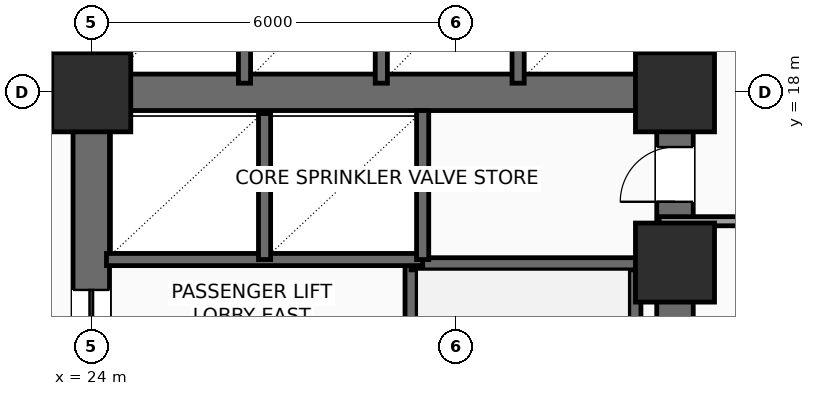
"""IFC4 building model, lengths in metres.
Left out: names, types, materials, properties, quantities, classifications, styles, units other than length and angle.
Written with IfcOpenShell. Run it as: python <this file> out.ifc"""

import sys

from ifc_helpers import new_model, si_unit, direction, frame, frame_2d, origin, origin_2d, place, context, subcontext, project, spatial, rectangle, extrude, element, fill, save


model = new_model("IFC4")
c1 = context("Model", 3, precision=1e-05, world=origin(), true_north=direction((0.0, 1.0)))
c2 = subcontext(c1, "Body", "Model", "MODEL_VIEW")
j1 = project(units=[si_unit("LENGTHUNIT", "METRE"), si_unit("PLANEANGLEUNIT", "RADIAN")], contexts=[c1])
p1 = place(None, origin())
s1 = spatial("IfcSite", under=j1, at=p1, CompositionType="ELEMENT")
p2 = place(p1, origin())
s2 = spatial("IfcBuilding", under=s1, at=p2, CompositionType="ELEMENT")
p3 = place(p2, frame((0.0, 0.0, 32.4)))
s3 = spatial("IfcBuildingStorey", under=s2, at=p3, CompositionType="ELEMENT", Elevation=32.4)
for number, where, z_axis, x_axis in (
    (1, (24.0, 18.0, 0.0), (0.0, 0.0, 1.0), (1.0, 0.0, 0.0)),
    (2, (33.6, 15.2, 0.0), (0.0, 0.0, 1.0), (1.0, 0.0, 0.0)),
    (3, (33.6, 18.0, 0.0), (0.0, 0.0, 1.0), (1.0, 0.0, 0.0)),
):
    element("IfcColumn", number, at=place(p3, frame(where, z_axis=z_axis, x_axis=x_axis)), inside=s3, PredefinedType="COLUMN", context=c2, shape_type="SweptSolid", body=[
        extrude(rectangle(XDim=1.3, YDim=1.3, at=origin_2d()), origin(), (0.0, 0.0, 1.0), 3.9),
    ])
p4 = place(p3, frame((24.0, 18.0, 0.0), z_axis=(0.0, 0.0, 1.0), x_axis=(1.0, 0.0, 0.0)))
e4 = element("IfcWall", 4, at=p4, inside=s3, PredefinedType="SHEAR", context=c2, shape_type="SweptSolid", body=[
    extrude(rectangle(XDim=9.6, YDim=0.6, at=frame_2d((4.8, 0.0))), origin(), (0.0, 0.0, 1.0), 3.65),
])
p5 = place(p3, frame((24.0, 6.0, 0.0), z_axis=(0.0, 0.0, 1.0), x_axis=(0.0, 1.0, 0.0)))
e5 = element("IfcWall", 5, at=p5, inside=s3, PredefinedType="SHEAR", context=c2, shape_type="SweptSolid", body=[
    extrude(rectangle(XDim=12.0, YDim=0.6, at=frame_2d((6.0, 0.0))), origin(), (0.0, 0.0, 1.0), 3.65),
])
p6 = place(p5, frame((7.15, 0.0, 0.0)))
e6 = element("IfcOpeningElement", 6, at=p6, cuts=e5, PredefinedType="OPENING", context=c2, shape_type="SweptSolid", body=[
    extrude(rectangle(XDim=1.6, YDim=2.3, at=frame_2d((0.8, 1.15))), frame((0.0, 0.31, 0.0), z_axis=(0.0, -1.0, 0.0), x_axis=(1.0, 0.0, 0.0)), (0.0, 0.0, 1.0), 0.62),
])
p7 = place(p3, frame((33.6, 6.0, 0.0), z_axis=(0.0, 0.0, 1.0), x_axis=(0.0, 1.0, 0.0)))
e7 = element("IfcWall", 7, at=p7, inside=s3, PredefinedType="SHEAR", context=c2, shape_type="SweptSolid", body=[
    extrude(rectangle(XDim=12.0, YDim=0.6, at=frame_2d((6.0, 0.0))), origin(), (0.0, 0.0, 1.0), 3.65),
])
p8 = place(p7, frame((10.2, 0.0, 0.0)))
e8 = element("IfcOpeningElement", 8, at=p8, cuts=e7, PredefinedType="OPENING", context=c2, shape_type="SweptSolid", body=[
    extrude(rectangle(XDim=0.9, YDim=2.15, at=frame_2d((0.45, 1.075))), frame((0.0, 0.31, 0.0), z_axis=(0.0, -1.0, 0.0), x_axis=(1.0, 0.0, 0.0)), (0.0, 0.0, 1.0), 0.62),
])
p9 = place(p3, frame((29.26, 6.3, 0.0), z_axis=(0.0, 0.0, 1.0), x_axis=(0.0, 1.0, 0.0)))
e9 = element("IfcWall", 9, at=p9, inside=s3, PredefinedType="SHEAR", context=c2, shape_type="SweptSolid", body=[
    extrude(rectangle(XDim=8.88, YDim=0.2, at=frame_2d((4.44, 0.0))), origin(), (0.0, 0.0, 1.0), 3.65),
])
p10 = place(p9, frame((0.35, 0.0, 0.0)))
e10 = element("IfcOpeningElement", 10, at=p10, cuts=e9, PredefinedType="OPENING", context=c2, shape_type="SweptSolid", body=[
    extrude(rectangle(XDim=1.1, YDim=2.2, at=frame_2d((0.55, 1.1))), frame((0.0, 0.11, 0.0), z_axis=(0.0, -1.0, 0.0), x_axis=(1.0, 0.0, 0.0)), (0.0, 0.0, 1.0), 0.22),
])
p11 = place(p3, frame((32.94, 6.3, 0.0), z_axis=(0.0, 0.0, 1.0), x_axis=(0.0, 1.0, 0.0)))
e11 = element("IfcWall", 11, at=p11, inside=s3, PredefinedType="SHEAR", context=c2, shape_type="SweptSolid", body=[
    extrude(rectangle(XDim=8.88, YDim=0.2, at=frame_2d((4.44, 0.0))), origin(), (0.0, 0.0, 1.0), 3.65),
])
p12 = place(p3, frame((29.26, 15.18, 0.0), z_axis=(0.0, 0.0, 1.0), x_axis=(1.0, 0.0, 0.0)))
e12 = element("IfcWall", 12, at=p12, inside=s3, PredefinedType="SHEAR", context=c2, shape_type="SweptSolid", body=[
    extrude(rectangle(XDim=4.04, YDim=0.2, at=frame_2d((2.02, 0.0))), origin(), (0.0, 0.0, 1.0), 3.65),
])
p13 = place(p3, frame((24.25, 15.25, 0.0), z_axis=(0.0, 0.0, 1.0), x_axis=(1.0, 0.0, 0.0)))
e13 = element("IfcWall", 13, at=p13, inside=s3, PredefinedType="SHEAR", context=c2, shape_type="SweptSolid", body=[
    extrude(rectangle(XDim=5.2, YDim=0.2, at=frame_2d((2.6, 0.0))), origin(), (0.0, 0.0, 1.0), 3.65),
])
p14 = place(p3, frame((26.85, 15.25, 0.0), z_axis=(0.0, 0.0, 1.0), x_axis=(0.0, 1.0, 0.0)))
e14 = element("IfcWall", 14, at=p14, inside=s3, PredefinedType="SHEAR", context=c2, shape_type="SweptSolid", body=[
    extrude(rectangle(XDim=2.4, YDim=0.2, at=frame_2d((1.2, 0.0))), origin(), (0.0, 0.0, 1.0), 3.65),
])
p15 = place(p3, frame((29.45, 15.25, 0.0), z_axis=(0.0, 0.0, 1.0), x_axis=(0.0, 1.0, 0.0)))
e15 = element("IfcWall", 15, at=p15, inside=s3, PredefinedType="SHEAR", context=c2, shape_type="SweptSolid", body=[
    extrude(rectangle(XDim=2.45, YDim=0.2, at=frame_2d((1.225, 0.0))), origin(), (0.0, 0.0, 1.0), 3.65),
])
p16 = place(p3, frame((20.45, 18.0, 0.0), z_axis=(0.0, 0.0, 1.0), x_axis=(1.0, 0.0, 0.0)))
e16 = element("IfcWall", 16, at=p16, inside=s3, PredefinedType="SHEAR", context=c2, shape_type="SweptSolid", body=[
    extrude(rectangle(XDim=3.5, YDim=0.2, at=frame_2d((1.75, 0.0))), origin(), (0.0, 0.0, 1.0), 3.65),
])
p17 = place(p16, frame((0.95, 0.0, 0.0)))
e17 = element("IfcOpeningElement", 17, at=p17, cuts=e16, PredefinedType="OPENING", context=c2, shape_type="SweptSolid", body=[
    extrude(rectangle(XDim=1.6, YDim=2.3, at=frame_2d((0.8, 1.15))), frame((0.0, 0.11, 0.0), z_axis=(0.0, -1.0, 0.0), x_axis=(1.0, 0.0, 0.0)), (0.0, 0.0, 1.0), 0.22),
])
p18 = place(p3, frame((23.95, 18.0, 0.0), z_axis=(0.0, 0.0, 1.0), x_axis=(0.0, 1.0, 0.0)))
e18 = element("IfcWall", 18, at=p18, inside=s3, PredefinedType="SHEAR", context=c2, shape_type="SweptSolid", body=[
    extrude(rectangle(XDim=9.3, YDim=0.2, at=frame_2d((4.65, 0.0))), origin(), (0.0, 0.0, 1.0), 3.65),
])
for number, where, z_axis, x_axis in (
    (19, (33.3, 18.1, 0.0), (0.0, 0.0, 1.0), (0.0, 1.0, 0.0)),
    (20, (24.25, 18.1, 0.0), (0.0, 0.0, 1.0), (0.0, 1.0, 0.0)),
):
    element("IfcWall", number, at=place(p3, frame(where, z_axis=z_axis, x_axis=x_axis)), inside=s3, PredefinedType="SHEAR", context=c2, shape_type="SweptSolid", body=[
        extrude(rectangle(XDim=2.35, YDim=0.2, at=frame_2d((1.175, 0.0))), origin(), (0.0, 0.0, 1.0), 3.65),
    ])
for number, where, z_axis, x_axis in (
    (21, (26.52, 18.15, 0.0), (0.0, 0.0, 1.0), (0.0, 1.0, 0.0)),
    (22, (28.77, 18.15, 0.0), (0.0, 0.0, 1.0), (0.0, 1.0, 0.0)),
    (23, (31.02, 18.15, 0.0), (0.0, 0.0, 1.0), (0.0, 1.0, 0.0)),
):
    element("IfcWall", number, at=place(p3, frame(where, z_axis=z_axis, x_axis=x_axis)), inside=s3, PredefinedType="SHEAR", context=c2, shape_type="SweptSolid", body=[
        extrude(rectangle(XDim=2.3, YDim=0.2, at=frame_2d((1.15, 0.0))), origin(), (0.0, 0.0, 1.0), 3.65),
    ])
p19 = place(p3, frame((36.15, 15.88, 0.0), z_axis=(0.0, 0.0, 1.0), x_axis=(-1.0, 0.0, 0.0)))
e24 = element("IfcWall", 24, at=p19, inside=s3, PredefinedType="PARTITIONING", context=c2, shape_type="SweptSolid", body=[
    extrude(rectangle(XDim=2.81, YDim=0.15, at=frame_2d((1.405, 0.0))), origin(), (0.0, 0.0, 1.0), 3.65),
])
p20 = place(p6, origin())
e25 = element("IfcDoor", 25, at=p20, inside=s3, OperationType="DOUBLE_DOOR_SLIDING", PredefinedType="DOOR", context=c2, shape_type="SweptSolid", body=[
    extrude(rectangle(XDim=1.6, YDim=2.3, at=frame_2d((0.8, 1.15))), frame((0.0, 0.025, 0.0), z_axis=(0.0, -1.0, 0.0), x_axis=(1.0, 0.0, 0.0)), (0.0, 0.0, 1.0), 0.05),
])
fill(e6, e25)
p21 = place(p8, origin())
e26 = element("IfcDoor", 26, at=p21, inside=s3, OperationType="SINGLE_SWING_LEFT", PredefinedType="DOOR", context=c2, shape_type="SweptSolid", body=[
    extrude(rectangle(XDim=0.9, YDim=2.15, at=frame_2d((0.45, 1.075))), frame((0.0, 0.025, 0.0), z_axis=(0.0, -1.0, 0.0), x_axis=(1.0, 0.0, 0.0)), (0.0, 0.0, 1.0), 0.05),
])
fill(e8, e26)
save(model, sys.argv[1])
